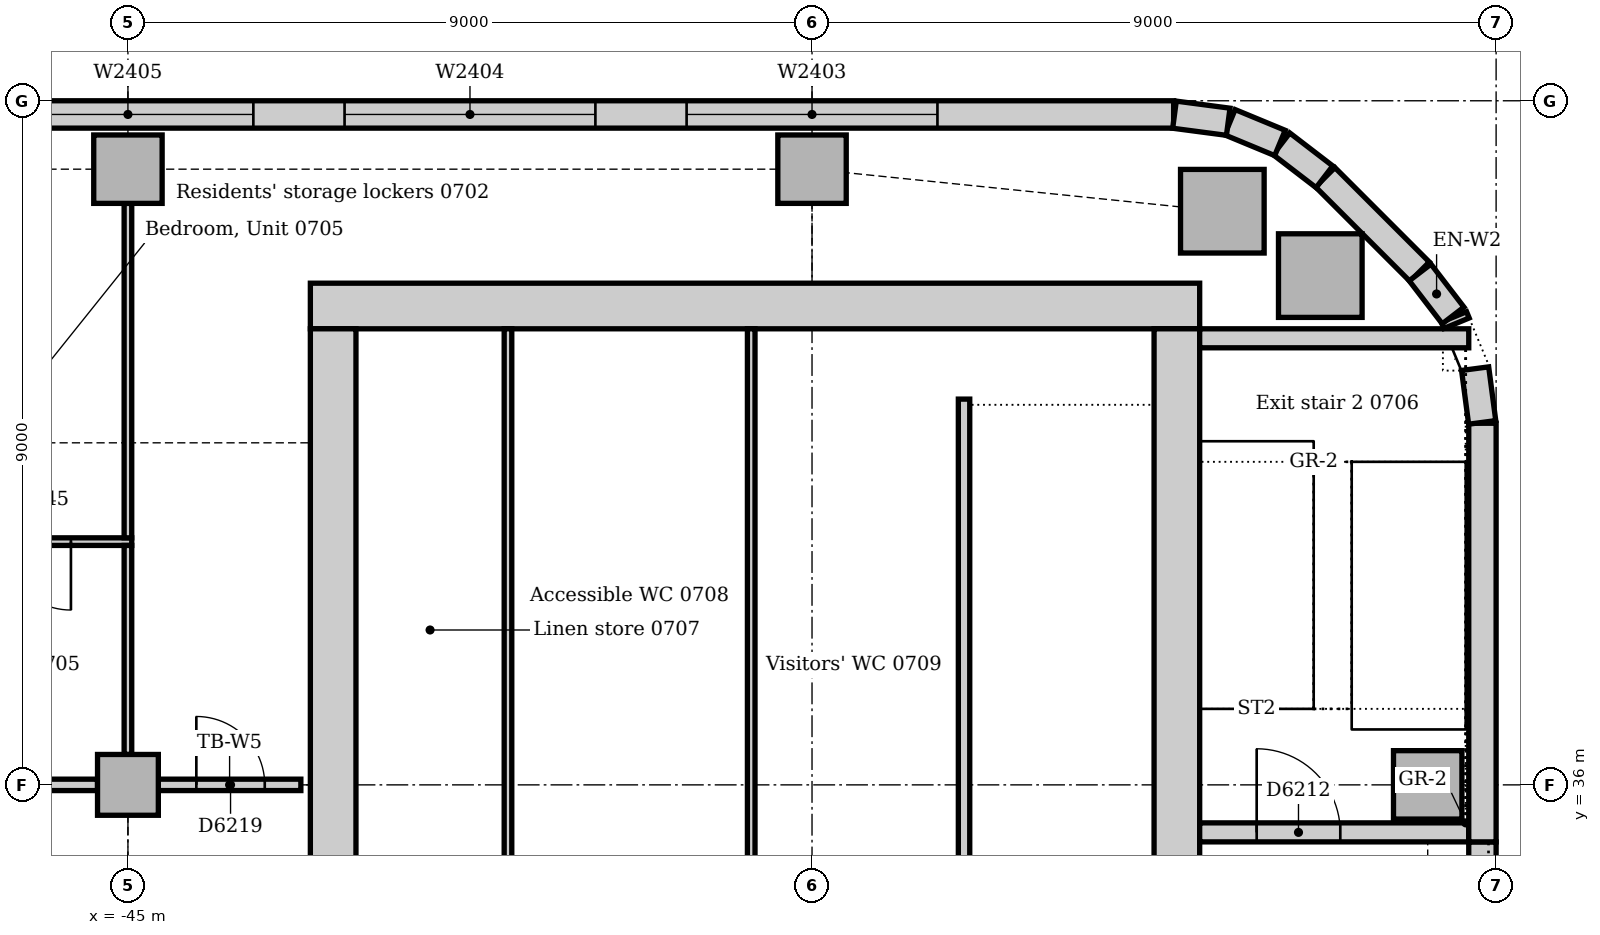
"""IFC4 building model, lengths in metres.
Left out: names, types, materials, properties, quantities, classifications, styles, units other than length and angle.
Written with IfcOpenShell. Run it as: python <this file> out.ifc"""

import sys

from ifc_helpers import new_model, si_unit, direction, frame, frame_2d, origin, origin_2d, place, context, subcontext, project, spatial, rectangle, extrude, element, fill, save


model = new_model("IFC4")
c1 = context("Model", 3, precision=1e-05, world=origin(), true_north=direction((0.0, 1.0)))
c2 = subcontext(c1, "Body", "Model", "MODEL_VIEW")
j1 = project(units=[si_unit("LENGTHUNIT", "METRE"), si_unit("PLANEANGLEUNIT", "RADIAN")], contexts=[c1])
p1 = place(None, origin())
s1 = spatial("IfcSite", under=j1, at=p1, CompositionType="ELEMENT")
p2 = place(p1, origin())
s2 = spatial("IfcBuilding", under=s1, at=p2, CompositionType="ELEMENT")
p3 = place(p2, frame((0.0, 0.0, 34.0)))
s3 = spatial("IfcBuildingStorey", under=s2, at=p3, CompositionType="ELEMENT", Elevation=34.0)
p4 = place(p3, frame((-30.9, 42.3, 0.0), z_axis=(0.0, 0.0, 1.0), x_axis=(-1.0, 0.0, 0.0)))
e1 = element("IfcWall", 1, at=p4, inside=s3, PredefinedType="SOLIDWALL", context=c2, shape_type="SweptSolid", body=[
    extrude(rectangle(XDim=11.7, YDim=0.6, at=frame_2d((5.85, 0.0))), origin(), (0.0, 0.0, 1.0), 4.0),
])
p5 = place(p3, frame((-31.2, 30.5, 0.0), z_axis=(0.0, 0.0, 1.0), x_axis=(0.0, 1.0, 0.0)))
e2 = element("IfcWall", 2, at=p5, inside=s3, PredefinedType="SOLIDWALL", context=c2, shape_type="SweptSolid", body=[
    extrude(rectangle(XDim=11.5, YDim=0.6, at=frame_2d((5.75, 0.0))), origin(), (0.0, 0.0, 1.0), 4.0),
])
p6 = place(p5, frame((0.85, 0.0, 0.0)))
e3 = element("IfcOpeningElement", 3, at=p6, cuts=e2, PredefinedType="OPENING", context=c2, shape_type="SweptSolid", body=[
    extrude(rectangle(XDim=1.8, YDim=2.1, at=frame_2d((0.9, 1.05))), frame((0.0, 0.31, 0.0), z_axis=(0.0, -1.0, 0.0), x_axis=(1.0, 0.0, 0.0)), (0.0, 0.0, 1.0), 0.62),
])
p7 = place(p3, frame((-42.3, 42.0, 0.0), z_axis=(0.0, 0.0, 1.0), x_axis=(0.0, -1.0, 0.0)))
e4 = element("IfcWall", 4, at=p7, inside=s3, PredefinedType="SOLIDWALL", context=c2, shape_type="SweptSolid", body=[
    extrude(rectangle(XDim=11.5, YDim=0.6, at=frame_2d((5.75, 0.0))), origin(), (0.0, 0.0, 1.0), 4.0),
])
p8 = place(p7, frame((8.85, 0.0, 0.0)))
e5 = element("IfcOpeningElement", 5, at=p8, cuts=e4, PredefinedType="OPENING", context=c2, shape_type="SweptSolid", body=[
    extrude(rectangle(XDim=1.8, YDim=2.1, at=frame_2d((0.9, 1.05))), frame((0.0, 0.31, 0.0), z_axis=(0.0, -1.0, 0.0), x_axis=(1.0, 0.0, 0.0)), (0.0, 0.0, 1.0), 0.62),
])
p9 = place(p3, frame((-30.9, 35.375, 0.0), z_axis=(0.0, 0.0, 1.0), x_axis=(1.0, 0.0, 0.0)))
e6 = element("IfcWall", 6, at=p9, inside=s3, PredefinedType="SOLIDWALL", context=c2, shape_type="SweptSolid", body=[
    extrude(rectangle(XDim=3.54, YDim=0.25, at=frame_2d((1.77, 0.0))), origin(), (0.0, 0.0, 1.0), 4.0),
])
p10 = place(p9, frame((0.75, 0.0, 0.0)))
e7 = element("IfcOpeningElement", 7, at=p10, cuts=e6, PredefinedType="OPENING", context=c2, shape_type="SweptSolid", body=[
    extrude(rectangle(XDim=1.1, YDim=2.1, at=frame_2d((0.55, 1.05))), frame((0.0, 0.135, 0.0), z_axis=(0.0, -1.0, 0.0), x_axis=(1.0, 0.0, 0.0)), (0.0, 0.0, 1.0), 0.27),
])
p11 = place(p3, frame((-27.36, 41.875, 0.0), z_axis=(0.0, 0.0, 1.0), x_axis=(-1.0, 0.0, 0.0)))
e8 = element("IfcWall", 8, at=p11, inside=s3, PredefinedType="SOLIDWALL", context=c2, shape_type="SweptSolid", body=[
    extrude(rectangle(XDim=3.54, YDim=0.25, at=frame_2d((1.77, 0.0))), origin(), (0.0, 0.0, 1.0), 4.0),
])
for number, where, z_axis, x_axis in (
    (9, (-29.313, 42.7, 0.0), (0.0, 0.0, 1.0), (1.0, 0.0, 0.0)),
    (10, (-30.602, 43.547, 0.0), (0.0, 0.0, 1.0), (1.0, 0.0, 0.0)),
):
    element("IfcColumn", number, at=place(p3, frame(where, z_axis=z_axis, x_axis=x_axis)), inside=s3, PredefinedType="COLUMN", context=c2, shape_type="SweptSolid", body=[
        extrude(rectangle(XDim=1.1, YDim=1.1, at=origin_2d()), origin(), (0.0, 0.0, 1.0), 3.85),
    ])
p12 = place(p3, frame((-27.9, 36.0, 0.0), z_axis=(0.0, 0.0, 1.0), x_axis=(1.0, 0.0, 0.0)))
e11 = element("IfcColumn", 11, at=p12, inside=s3, PredefinedType="COLUMN", context=c2, shape_type="SweptSolid", body=[
    extrude(rectangle(XDim=0.9, YDim=0.9, at=origin_2d()), origin(), (0.0, 0.0, 1.0), 4.0),
])
for number, where, z_axis, x_axis in (
    (12, (-45.0, 44.1, 0.0), (0.0, 0.0, 1.0), (1.0, 0.0, 0.0)),
    (13, (-36.0, 44.1, 0.0), (0.0, 0.0, 1.0), (1.0, 0.0, 0.0)),
):
    element("IfcColumn", number, at=place(p3, frame(where, z_axis=z_axis, x_axis=x_axis)), inside=s3, PredefinedType="COLUMN", context=c2, shape_type="SweptSolid", body=[
        extrude(rectangle(XDim=0.9, YDim=0.9, at=origin_2d()), origin(), (0.0, 0.0, 1.0), 3.85),
    ])
p13 = place(p3, frame((-45.0, 36.0, 0.0), z_axis=(0.0, 0.0, 1.0), x_axis=(1.0, 0.0, 0.0)))
e14 = element("IfcColumn", 14, at=p13, inside=s3, PredefinedType="COLUMN", context=c2, shape_type="SweptSolid", body=[
    extrude(rectangle(XDim=0.8, YDim=0.8, at=origin_2d()), origin(), (0.0, 0.0, 1.0), 3.85),
])
p14 = place(p3, frame((-27.18, 27.75, 0.0), z_axis=(0.0, 0.0, 1.0), x_axis=(0.0, 1.0, 0.0)))
e15 = element("IfcWall", 15, at=p14, inside=s3, PredefinedType="STANDARD", context=c2, shape_type="SweptSolid", body=[
    extrude(rectangle(XDim=7.5, YDim=0.36, at=frame_2d((3.75, 0.0))), origin(), (0.0, 0.0, 1.0), 3.85),
])
p15 = place(p14, frame((2.85, 0.0, 1.2)))
e16 = element("IfcOpeningElement", 16, at=p15, cuts=e15, PredefinedType="OPENING", context=c2, shape_type="SweptSolid", body=[
    extrude(rectangle(XDim=1.8, YDim=1.2, at=frame_2d((0.9, 0.6))), frame((0.0, 0.19, 0.0), z_axis=(0.0, -1.0, 0.0), x_axis=(1.0, 0.0, 0.0)), (0.0, 0.0, 1.0), 0.38),
])
p16 = place(p3, frame((-27.18, 35.25, 0.0), z_axis=(0.0, 0.0, 1.0), x_axis=(0.0, 1.0, 0.0)))
e17 = element("IfcWall", 17, at=p16, inside=s3, PredefinedType="STANDARD", context=c2, shape_type="SweptSolid", body=[
    extrude(rectangle(XDim=5.507, YDim=0.36, at=frame_2d((2.754, 0.0))), origin(), (0.0, 0.0, 1.0), 3.85),
])
p17 = place(p3, frame((-28.006, 42.751, 0.0), z_axis=(0.0, 0.0, 1.0), x_axis=(-0.707106781187, 0.707106781187, 0.0)))
e18 = element("IfcWall", 18, at=p17, inside=s3, PredefinedType="STANDARD", context=c2, shape_type="SweptSolid", body=[
    extrude(rectangle(XDim=1.757, YDim=0.36, at=frame_2d((0.879, 0.0))), origin(), (0.0, 0.0, 1.0), 3.85),
])
p18 = place(p3, frame((-31.243, 44.82, 0.0), z_axis=(0.0, 0.0, 1.0), x_axis=(-1.0, 0.0, 0.0)))
e19 = element("IfcWall", 19, at=p18, inside=s3, PredefinedType="STANDARD", context=c2, shape_type="SweptSolid", body=[
    extrude(rectangle(XDim=36.515, YDim=0.36, at=frame_2d((18.257, 0.0))), origin(), (0.0, 0.0, 1.0), 3.85),
])
p19 = place(p18, frame((3.107, 0.0, 0.9)))
e20 = element("IfcOpeningElement", 20, at=p19, cuts=e19, PredefinedType="OPENING", context=c2, shape_type="SweptSolid", body=[
    extrude(rectangle(XDim=3.3, YDim=1.6, at=frame_2d((1.65, 0.8))), frame((0.0, 0.19, 0.0), z_axis=(0.0, -1.0, 0.0), x_axis=(1.0, 0.0, 0.0)), (0.0, 0.0, 1.0), 0.38),
])
p20 = place(p18, frame((7.607, 0.0, 0.9)))
e21 = element("IfcOpeningElement", 21, at=p20, cuts=e19, PredefinedType="OPENING", context=c2, shape_type="SweptSolid", body=[
    extrude(rectangle(XDim=3.3, YDim=1.6, at=frame_2d((1.65, 0.8))), frame((0.0, 0.19, 0.0), z_axis=(0.0, -1.0, 0.0), x_axis=(1.0, 0.0, 0.0)), (0.0, 0.0, 1.0), 0.38),
])
p21 = place(p18, frame((12.107, 0.0, 0.9)))
e22 = element("IfcOpeningElement", 22, at=p21, cuts=e19, PredefinedType="OPENING", context=c2, shape_type="SweptSolid", body=[
    extrude(rectangle(XDim=3.3, YDim=1.6, at=frame_2d((1.65, 0.8))), frame((0.0, 0.19, 0.0), z_axis=(0.0, -1.0, 0.0), x_axis=(1.0, 0.0, 0.0)), (0.0, 0.0, 1.0), 0.38),
])
p22 = place(p18, frame((16.607, 0.0, 0.9)))
e23 = element("IfcOpeningElement", 23, at=p22, cuts=e19, PredefinedType="OPENING", context=c2, shape_type="SweptSolid", body=[
    extrude(rectangle(XDim=3.3, YDim=1.6, at=frame_2d((1.65, 0.8))), frame((0.0, 0.19, 0.0), z_axis=(0.0, -1.0, 0.0), x_axis=(1.0, 0.0, 0.0)), (0.0, 0.0, 1.0), 0.38),
])
p23 = place(p18, frame((21.107, 0.0, 0.9)))
e24 = element("IfcOpeningElement", 24, at=p23, cuts=e19, PredefinedType="OPENING", context=c2, shape_type="SweptSolid", body=[
    extrude(rectangle(XDim=3.3, YDim=1.6, at=frame_2d((1.65, 0.8))), frame((0.0, 0.19, 0.0), z_axis=(0.0, -1.0, 0.0), x_axis=(1.0, 0.0, 0.0)), (0.0, 0.0, 1.0), 0.38),
])
p24 = place(p18, frame((25.607, 0.0, 0.9)))
e25 = element("IfcOpeningElement", 25, at=p24, cuts=e19, PredefinedType="OPENING", context=c2, shape_type="SweptSolid", body=[
    extrude(rectangle(XDim=3.3, YDim=1.6, at=frame_2d((1.65, 0.8))), frame((0.0, 0.19, 0.0), z_axis=(0.0, -1.0, 0.0), x_axis=(1.0, 0.0, 0.0)), (0.0, 0.0, 1.0), 0.38),
])
p25 = place(p18, frame((30.107, 0.0, 0.9)))
e26 = element("IfcOpeningElement", 26, at=p25, cuts=e19, PredefinedType="OPENING", context=c2, shape_type="SweptSolid", body=[
    extrude(rectangle(XDim=3.3, YDim=1.6, at=frame_2d((1.65, 0.8))), frame((0.0, 0.19, 0.0), z_axis=(0.0, -1.0, 0.0), x_axis=(1.0, 0.0, 0.0)), (0.0, 0.0, 1.0), 0.38),
])
p26 = place(p3, frame((-27.183, 40.769, 0.0), z_axis=(0.0, 0.0, 1.0), x_axis=(-0.13055608231, 0.99144092581, 0.0)))
e27 = element("IfcWall", 27, at=p26, inside=s3, PredefinedType="STANDARD", context=c2, shape_type="SweptSolid", body=[
    extrude(rectangle(XDim=0.713, YDim=0.36, at=frame_2d((0.356, 0.0))), origin(), (0.0, 0.0, 1.0), 3.85),
])
p27 = place(p3, frame((-27.521, 42.074, 0.0), z_axis=(0.0, 0.0, 1.0), x_axis=(-0.382549378284, 0.923935048136, 0.0)))
e28 = element("IfcWall", 28, at=p27, inside=s3, PredefinedType="STANDARD", context=c2, shape_type="SweptSolid", body=[
    extrude(rectangle(XDim=0.089, YDim=0.36, at=frame_2d((0.045, 0.0))), origin(), (0.0, 0.0, 1.0), 3.85),
])
for number, where, z_axis, x_axis in (
    (29, (-27.566, 42.175, 0.0), (0.0, 0.0, 1.0), (-0.609, 0.793, 0.0)),
    (30, (-29.259, 44.0, 0.0), (0.0, 0.0, 1.0), (-0.793, 0.609, 0.0)),
):
    element("IfcWall", number, at=place(p3, frame(where, z_axis=z_axis, x_axis=x_axis)), inside=s3, PredefinedType="STANDARD", context=c2, shape_type="SweptSolid", body=[
        extrude(rectangle(XDim=0.713, YDim=0.36, at=frame_2d((0.357, 0.0))), origin(), (0.0, 0.0, 1.0), 3.85),
    ])
for number, where, z_axis, x_axis in (
    (31, (-29.844, 44.445, 0.0), (0.0, 0.0, 1.0), (-0.924, 0.383, 0.0)),
    (32, (-30.524, 44.724, 0.0), (0.0, 0.0, 1.0), (-0.991, 0.131, 0.0)),
):
    element("IfcWall", number, at=place(p3, frame(where, z_axis=z_axis, x_axis=x_axis)), inside=s3, PredefinedType="STANDARD", context=c2, shape_type="SweptSolid", body=[
        extrude(rectangle(XDim=0.713, YDim=0.36, at=frame_2d((0.356, 0.0))), origin(), (0.0, 0.0, 1.0), 3.85),
    ])
p28 = place(p3, frame((-34.0, 41.075, 0.0), z_axis=(0.0, 0.0, 1.0), x_axis=(0.0, -1.0, 0.0)))
e33 = element("IfcWall", 33, at=p28, inside=s3, PredefinedType="SOLIDWALL", context=c2, shape_type="SweptSolid", body=[
    extrude(rectangle(XDim=7.0, YDim=0.15, at=frame_2d((3.5, 0.0))), origin(), (0.0, 0.0, 1.0), 4.0),
])
for number, where, z_axis, x_axis in (
    (34, (-40.0, 34.075, 0.0), (0.0, 0.0, 1.0), (0.0, 1.0, 0.0)),
    (35, (-36.8, 34.075, 0.0), (0.0, 0.0, 1.0), (0.0, 1.0, 0.0)),
):
    element("IfcWall", number, at=place(p3, frame(where, z_axis=z_axis, x_axis=x_axis)), inside=s3, PredefinedType="PARTITIONING", context=c2, shape_type="SweptSolid", body=[
        extrude(rectangle(XDim=7.925, YDim=0.1, at=frame_2d((3.962, 0.0))), origin(), (0.0, 0.0, 1.0), 3.85),
    ])
p29 = place(p3, frame((-44.6, 36.0, 0.0), z_axis=(0.0, 0.0, 1.0), x_axis=(1.0, 0.0, 0.0)))
e36 = element("IfcWall", 36, at=p29, inside=s3, PredefinedType="PARTITIONING", context=c2, shape_type="SweptSolid", body=[
    extrude(rectangle(XDim=1.875, YDim=0.15, at=frame_2d((0.938, 0.0))), origin(), (0.0, 0.0, 1.0), 3.602),
])
p30 = place(p29, frame((0.5, 0.0, 0.0)))
e37 = element("IfcOpeningElement", 37, at=p30, cuts=e36, PredefinedType="OPENING", context=c2, shape_type="SweptSolid", body=[
    extrude(rectangle(XDim=0.9, YDim=2.1, at=frame_2d((0.45, 1.05))), frame((0.0, 0.085, 0.0), z_axis=(0.0, -1.0, 0.0), x_axis=(1.0, 0.0, 0.0)), (0.0, 0.0, 1.0), 0.17),
])
p31 = place(p3, frame((-53.6, 36.0, 0.0), z_axis=(0.0, 0.0, 1.0), x_axis=(1.0, 0.0, 0.0)))
e38 = element("IfcWall", 38, at=p31, inside=s3, PredefinedType="PARTITIONING", context=c2, shape_type="SweptSolid", body=[
    extrude(rectangle(XDim=8.2, YDim=0.15, at=frame_2d((4.1, 0.0))), origin(), (0.0, 0.0, 1.0), 3.15),
])
p32 = place(p3, frame((-62.925, 39.2, 0.0), z_axis=(0.0, 0.0, 1.0), x_axis=(1.0, 0.0, 0.0)))
e39 = element("IfcWall", 39, at=p32, inside=s3, PredefinedType="PARTITIONING", context=c2, shape_type="SweptSolid", body=[
    extrude(rectangle(XDim=17.975, YDim=0.1, at=frame_2d((8.988, 0.0))), origin(), (0.0, 0.0, 1.0), 3.85),
])
p33 = place(p32, frame((11.635, 0.0, 0.0)))
e40 = element("IfcOpeningElement", 40, at=p33, cuts=e39, PredefinedType="OPENING", context=c2, shape_type="SweptSolid", body=[
    extrude(rectangle(XDim=0.9, YDim=2.1, at=frame_2d((0.45, 1.05))), frame((0.0, 0.06, 0.0), z_axis=(0.0, -1.0, 0.0), x_axis=(1.0, 0.0, 0.0)), (0.0, 0.0, 1.0), 0.12),
])
p34 = place(p32, frame((4.865, 0.0, 0.0)))
e41 = element("IfcOpeningElement", 41, at=p34, cuts=e39, PredefinedType="OPENING", context=c2, shape_type="SweptSolid", body=[
    extrude(rectangle(XDim=0.9, YDim=2.1, at=frame_2d((0.45, 1.05))), frame((0.0, 0.06, 0.0), z_axis=(0.0, -1.0, 0.0), x_axis=(1.0, 0.0, 0.0)), (0.0, 0.0, 1.0), 0.12),
])
p35 = place(p32, frame((16.275, 0.0, 0.0)))
e42 = element("IfcOpeningElement", 42, at=p35, cuts=e39, PredefinedType="OPENING", context=c2, shape_type="SweptSolid", body=[
    extrude(rectangle(XDim=0.9, YDim=2.1, at=frame_2d((0.45, 1.05))), frame((0.0, 0.06, 0.0), z_axis=(0.0, -1.0, 0.0), x_axis=(1.0, 0.0, 0.0)), (0.0, 0.0, 1.0), 0.12),
])
p36 = place(p3, frame((-45.0, 39.25, 0.0), z_axis=(0.0, 0.0, 1.0), x_axis=(0.0, 1.0, 0.0)))
e43 = element("IfcWall", 43, at=p36, inside=s3, PredefinedType="PARTITIONING", context=c2, shape_type="SweptSolid", body=[
    extrude(rectangle(XDim=4.4, YDim=0.1, at=frame_2d((2.2, 0.0))), origin(), (0.0, 0.0, 1.0), 3.158),
])
p37 = place(p3, frame((-45.0, 36.4, 0.0), z_axis=(0.0, 0.0, 1.0), x_axis=(0.0, 1.0, 0.0)))
e44 = element("IfcWall", 44, at=p37, inside=s3, PredefinedType="PARTITIONING", context=c2, shape_type="SweptSolid", body=[
    extrude(rectangle(XDim=2.75, YDim=0.1, at=frame_2d((1.375, 0.0))), origin(), (0.0, 0.0, 1.0), 3.158),
])
p38 = place(p19, origin())
e45 = element("IfcWindow", 45, at=p38, inside=s3, PartitioningType="SINGLE_PANEL", PredefinedType="WINDOW", context=c2, shape_type="SweptSolid", body=[
    extrude(rectangle(XDim=3.3, YDim=1.6, at=frame_2d((1.65, 0.8))), frame((0.0, 0.13, 0.0), z_axis=(0.0, -1.0, 0.0), x_axis=(1.0, 0.0, 0.0)), (0.0, 0.0, 1.0), 0.06),
])
fill(e20, e45)
p39 = place(p20, origin())
e46 = element("IfcWindow", 46, at=p39, inside=s3, PartitioningType="SINGLE_PANEL", PredefinedType="WINDOW", context=c2, shape_type="SweptSolid", body=[
    extrude(rectangle(XDim=3.3, YDim=1.6, at=frame_2d((1.65, 0.8))), frame((0.0, 0.13, 0.0), z_axis=(0.0, -1.0, 0.0), x_axis=(1.0, 0.0, 0.0)), (0.0, 0.0, 1.0), 0.06),
])
fill(e21, e46)
p40 = place(p21, origin())
e47 = element("IfcWindow", 47, at=p40, inside=s3, PartitioningType="SINGLE_PANEL", PredefinedType="WINDOW", context=c2, shape_type="SweptSolid", body=[
    extrude(rectangle(XDim=3.3, YDim=1.6, at=frame_2d((1.65, 0.8))), frame((0.0, 0.13, 0.0), z_axis=(0.0, -1.0, 0.0), x_axis=(1.0, 0.0, 0.0)), (0.0, 0.0, 1.0), 0.06),
])
fill(e22, e47)
p41 = place(p10, origin())
e48 = element("IfcDoor", 48, at=p41, inside=s3, OperationType="SINGLE_SWING_LEFT", PredefinedType="DOOR", context=c2, shape_type="SweptSolid", body=[
    extrude(rectangle(XDim=1.1, YDim=2.1, at=frame_2d((0.55, 1.05))), frame((0.0, 0.025, 0.0), z_axis=(0.0, -1.0, 0.0), x_axis=(1.0, 0.0, 0.0)), (0.0, 0.0, 1.0), 0.05),
])
fill(e7, e48)
p42 = place(p30, origin())
e49 = element("IfcDoor", 49, at=p42, inside=s3, OperationType="SINGLE_SWING_LEFT", PredefinedType="DOOR", context=c2, shape_type="SweptSolid", body=[
    extrude(rectangle(XDim=0.9, YDim=2.1, at=frame_2d((0.45, 1.05))), frame((0.0, 0.025, 0.0), z_axis=(0.0, -1.0, 0.0), x_axis=(1.0, 0.0, 0.0)), (0.0, 0.0, 1.0), 0.05),
])
fill(e37, e49)
p43 = place(p35, frame((0.9, 0.0, 0.0), z_axis=(0.0, 0.0, 1.0), x_axis=(-1.0, 0.0, 0.0)))
e50 = element("IfcDoor", 50, at=p43, inside=s3, OperationType="SINGLE_SWING_LEFT", PredefinedType="DOOR", context=c2, shape_type="SweptSolid", body=[
    extrude(rectangle(XDim=0.9, YDim=2.1, at=frame_2d((0.45, 1.05))), frame((0.0, 0.025, 0.0), z_axis=(0.0, -1.0, 0.0), x_axis=(1.0, 0.0, 0.0)), (0.0, 0.0, 1.0), 0.05),
])
fill(e42, e50)
save(model, sys.argv[1])
